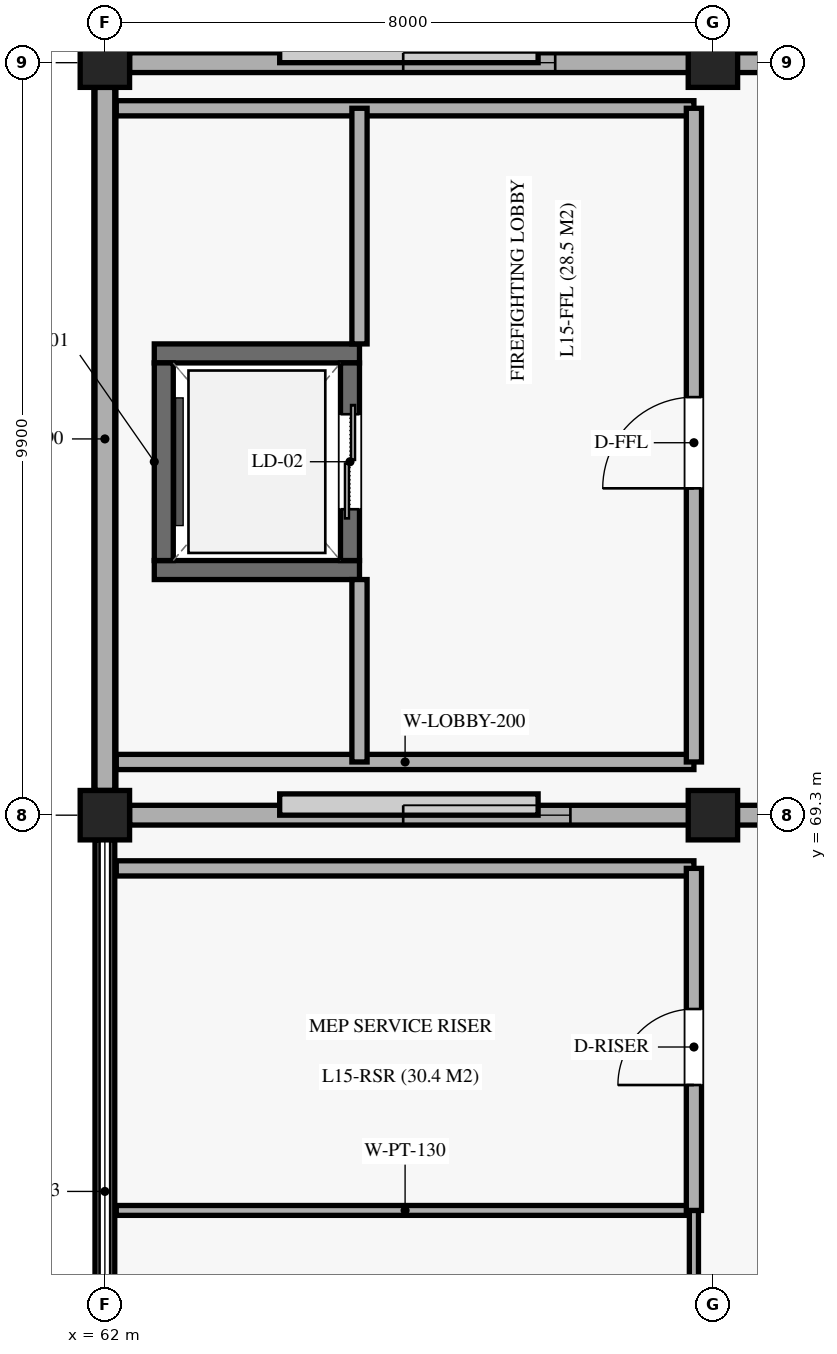
"""IFC4 building model, lengths in metres.
Left out: names, types, materials, properties, quantities, classifications, styles, units other than length and angle.
Written with IfcOpenShell. Run it as: python <this file> out.ifc"""

import sys

from ifc_helpers import new_model, si_unit, direction, frame, frame_2d, origin, origin_2d, place, context, subcontext, project, spatial, polyline, rectangle, outline, extrude, element, fill, save


model = new_model("IFC4")
c1 = context("Model", 3, precision=1e-05, world=origin(), true_north=direction((0.0, 1.0)))
c2 = subcontext(c1, "Body", "Model", "MODEL_VIEW")
j1 = project(units=[si_unit("LENGTHUNIT", "METRE"), si_unit("PLANEANGLEUNIT", "RADIAN")], contexts=[c1])
p1 = place(None, origin())
s1 = spatial("IfcSite", under=j1, at=p1, CompositionType="ELEMENT")
p2 = place(p1, origin())
s2 = spatial("IfcBuilding", under=s1, at=p2, CompositionType="ELEMENT")
p3 = place(p2, frame((0.0, 0.0, 74.46)))
s3 = spatial("IfcBuildingStorey", under=s2, at=p3, CompositionType="ELEMENT", Elevation=74.46)
for number, where, z_axis, x_axis in (
    (1, (62.0, 69.3, 0.0), (0.0, 0.0, 1.0), (1.0, 0.0, 0.0)),
    (2, (62.0, 79.2, 0.0), (0.0, 0.0, 1.0), (1.0, 0.0, 0.0)),
    (3, (70.0, 69.3, 0.0), (0.0, 0.0, 1.0), (1.0, 0.0, 0.0)),
    (4, (70.0, 79.2, 0.0), (0.0, 0.0, 1.0), (1.0, 0.0, 0.0)),
):
    element("IfcColumn", number, at=place(p3, frame(where, z_axis=z_axis, x_axis=x_axis)), inside=s3, PredefinedType="COLUMN", context=c2, shape_type="SweptSolid", body=[
        extrude(rectangle(XDim=0.65, YDim=0.65, at=origin_2d()), origin(), (0.0, 0.0, 1.0), 7.49),
    ])
p4 = place(p3, frame((62.0, 69.625, 0.0), z_axis=(0.0, 0.0, 1.0), x_axis=(0.0, 1.0, 0.0)))
e5 = element("IfcWall", 5, at=p4, inside=s3, PredefinedType="SOLIDWALL", context=c2, shape_type="SweptSolid", body=[
    extrude(rectangle(XDim=9.25, YDim=0.29, at=frame_2d((4.625, 0.0))), origin(), (0.0, 0.0, 1.0), 3.29),
])
p5 = place(p3, frame((62.325, 69.3, 4.04), z_axis=(0.0, 0.0, 1.0), x_axis=(1.0, 0.0, 0.0)))
e6 = element("IfcWall", 6, at=p5, inside=s3, PredefinedType="SOLIDWALL", context=c2, shape_type="SweptSolid", body=[
    extrude(rectangle(XDim=29.35, YDim=0.26, at=frame_2d((14.675, 0.0))), origin(), (0.0, 0.0, 1.0), 2.956),
])
p6 = place(p5, frame((3.6, 0.0, 1.15)))
e7 = element("IfcOpeningElement", 7, at=p6, cuts=e6, PredefinedType="OPENING", context=c2, shape_type="SweptSolid", body=[
    extrude(rectangle(XDim=2.2, YDim=1.45, at=frame_2d((1.1, 0.725))), frame((0.0, 0.14, 0.0), z_axis=(0.0, -1.0, 0.0), x_axis=(1.0, 0.0, 0.0)), (0.0, 0.0, 1.0), 0.28),
])
p7 = place(p5, frame((10.6, 0.0, 1.15)))
e8 = element("IfcOpeningElement", 8, at=p7, cuts=e6, PredefinedType="OPENING", context=c2, shape_type="SweptSolid", body=[
    extrude(rectangle(XDim=2.0, YDim=1.45, at=frame_2d((1.0, 0.725))), frame((0.0, 0.14, 0.0), z_axis=(0.0, -1.0, 0.0), x_axis=(1.0, 0.0, 0.0)), (0.0, 0.0, 1.0), 0.28),
])
p8 = place(p5, frame((16.6, 0.0, 1.15)))
e9 = element("IfcOpeningElement", 9, at=p8, cuts=e6, PredefinedType="OPENING", context=c2, shape_type="SweptSolid", body=[
    extrude(rectangle(XDim=2.6, YDim=1.45, at=frame_2d((1.3, 0.725))), frame((0.0, 0.14, 0.0), z_axis=(0.0, -1.0, 0.0), x_axis=(1.0, 0.0, 0.0)), (0.0, 0.0, 1.0), 0.28),
])
p9 = place(p5, frame((22.6, 0.0, 1.15)))
e10 = element("IfcOpeningElement", 10, at=p9, cuts=e6, PredefinedType="OPENING", context=c2, shape_type="SweptSolid", body=[
    extrude(rectangle(XDim=2.4, YDim=1.45, at=frame_2d((1.2, 0.725))), frame((0.0, 0.14, 0.0), z_axis=(0.0, -1.0, 0.0), x_axis=(1.0, 0.0, 0.0)), (0.0, 0.0, 1.0), 0.28),
])
p10 = place(p3, frame((62.0, 59.725, 4.04), z_axis=(0.0, 0.0, 1.0), x_axis=(0.0, 1.0, 0.0)))
e11 = element("IfcWall", 11, at=p10, inside=s3, PredefinedType="SOLIDWALL", context=c2, shape_type="SweptSolid", body=[
    extrude(outline(polyline([(0.0, 0.0), (9.25, 0.0), (9.25, 3.62), (0.0, 0.1), (0.0, 0.0)])), frame((0.0, 0.13, 0.0), z_axis=(0.0, -1.0, 0.0), x_axis=(1.0, 0.0, 0.0)), (0.0, 0.0, 1.0), 0.26),
])
p11 = place(p3, frame((62.325, 79.2, 4.04), z_axis=(0.0, 0.0, 1.0), x_axis=(1.0, 0.0, 0.0)))
e12 = element("IfcWall", 12, at=p11, inside=s3, PredefinedType="SOLIDWALL", context=c2, shape_type="SweptSolid", body=[
    extrude(rectangle(XDim=29.35, YDim=0.26, at=frame_2d((14.675, 0.0))), origin(), (0.0, 0.0, 1.0), 2.956),
])
p12 = place(p11, frame((3.6, 0.0, 1.15)))
e13 = element("IfcOpeningElement", 13, at=p12, cuts=e12, PredefinedType="OPENING", context=c2, shape_type="SweptSolid", body=[
    extrude(rectangle(XDim=2.0, YDim=1.45, at=frame_2d((1.0, 0.725))), frame((0.0, 0.14, 0.0), z_axis=(0.0, -1.0, 0.0), x_axis=(1.0, 0.0, 0.0)), (0.0, 0.0, 1.0), 0.28),
])
p13 = place(p11, frame((10.6, 0.0, 1.15)))
e14 = element("IfcOpeningElement", 14, at=p13, cuts=e12, PredefinedType="OPENING", context=c2, shape_type="SweptSolid", body=[
    extrude(rectangle(XDim=2.6, YDim=1.45, at=frame_2d((1.3, 0.725))), frame((0.0, 0.14, 0.0), z_axis=(0.0, -1.0, 0.0), x_axis=(1.0, 0.0, 0.0)), (0.0, 0.0, 1.0), 0.28),
])
p14 = place(p11, frame((16.6, 0.0, 1.15)))
e15 = element("IfcOpeningElement", 15, at=p14, cuts=e12, PredefinedType="OPENING", context=c2, shape_type="SweptSolid", body=[
    extrude(rectangle(XDim=2.4, YDim=1.45, at=frame_2d((1.2, 0.725))), frame((0.0, 0.14, 0.0), z_axis=(0.0, -1.0, 0.0), x_axis=(1.0, 0.0, 0.0)), (0.0, 0.0, 1.0), 0.28),
])
p15 = place(p11, frame((22.6, 0.0, 1.15)))
e16 = element("IfcOpeningElement", 16, at=p15, cuts=e12, PredefinedType="OPENING", context=c2, shape_type="SweptSolid", body=[
    extrude(rectangle(XDim=2.2, YDim=1.45, at=frame_2d((1.1, 0.725))), frame((0.0, 0.14, 0.0), z_axis=(0.0, -1.0, 0.0), x_axis=(1.0, 0.0, 0.0)), (0.0, 0.0, 1.0), 0.28),
])
p16 = place(p3, frame((62.0, 69.625, 4.04), z_axis=(0.0, 0.0, 1.0), x_axis=(0.0, 1.0, 0.0)))
e17 = element("IfcWall", 17, at=p16, inside=s3, PredefinedType="SOLIDWALL", context=c2, shape_type="SweptSolid", body=[
    extrude(outline(polyline([(0.0, 0.0), (9.25, 0.0), (9.25, 3.62), (0.0, 0.1), (0.0, 0.0)])), frame((0.0, 0.13, 0.0), z_axis=(0.0, -1.0, 0.0), x_axis=(1.0, 0.0, 0.0)), (0.0, 0.0, 1.0), 0.26),
])
for number, where, z_axis, x_axis in (
    (18, (62.65, 72.525, 0.0), (0.0, 0.0, 1.0), (1.0, 0.0, 0.0)),
    (19, (62.65, 75.375, 0.0), (0.0, 0.0, 1.0), (1.0, 0.0, 0.0)),
):
    element("IfcWall", number, at=place(p3, frame(where, z_axis=z_axis, x_axis=x_axis)), inside=s3, PredefinedType="SOLIDWALL", context=c2, shape_type="SweptSolid", body=[
        extrude(rectangle(XDim=2.7, YDim=0.25, at=frame_2d((1.35, 0.0))), origin(), (0.0, 0.0, 1.0), 4.02),
    ])
p17 = place(p3, frame((62.775, 72.65, 0.0), z_axis=(0.0, 0.0, 1.0), x_axis=(0.0, 1.0, 0.0)))
e20 = element("IfcWall", 20, at=p17, inside=s3, PredefinedType="SOLIDWALL", context=c2, shape_type="SweptSolid", body=[
    extrude(rectangle(XDim=2.6, YDim=0.25, at=frame_2d((1.3, 0.0))), origin(), (0.0, 0.0, 1.0), 4.02),
])
p18 = place(p3, frame((65.225, 72.65, 0.0), z_axis=(0.0, 0.0, 1.0), x_axis=(0.0, 1.0, 0.0)))
e21 = element("IfcWall", 21, at=p18, inside=s3, PredefinedType="SOLIDWALL", context=c2, shape_type="SweptSolid", body=[
    extrude(rectangle(XDim=2.6, YDim=0.25, at=frame_2d((1.3, 0.0))), origin(), (0.0, 0.0, 1.0), 4.02),
])
p19 = place(p18, frame((0.675, 0.0, 0.0)))
e22 = element("IfcOpeningElement", 22, at=p19, cuts=e21, PredefinedType="OPENING", context=c2, shape_type="SweptSolid", body=[
    extrude(rectangle(XDim=1.25, YDim=2.2, at=frame_2d((0.625, 1.1))), frame((0.0, 0.135, 0.0), z_axis=(0.0, -1.0, 0.0), x_axis=(1.0, 0.0, 0.0)), (0.0, 0.0, 1.0), 0.27),
])
for number, where, z_axis, x_axis in (
    (23, (62.15, 70.0, 0.0), (0.0, 0.0, 1.0), (1.0, 0.0, 0.0)),
    (24, (62.15, 78.6, 0.0), (0.0, 0.0, 1.0), (1.0, 0.0, 0.0)),
):
    element("IfcWall", number, at=place(p3, frame(where, z_axis=z_axis, x_axis=x_axis)), inside=s3, PredefinedType="SOLIDWALL", context=c2, shape_type="SweptSolid", body=[
        extrude(rectangle(XDim=7.6, YDim=0.2, at=frame_2d((3.8, 0.0))), origin(), (0.0, 0.0, 1.0), 3.16),
    ])
p20 = place(p3, frame((65.35, 70.0, 0.0), z_axis=(0.0, 0.0, 1.0), x_axis=(0.0, 1.0, 0.0)))
e25 = element("IfcWall", 25, at=p20, inside=s3, PredefinedType="SOLIDWALL", context=c2, shape_type="SweptSolid", body=[
    extrude(rectangle(XDim=2.4, YDim=0.2, at=frame_2d((1.2, 0.0))), origin(), (0.0, 0.0, 1.0), 3.16),
])
p21 = place(p3, frame((65.35, 75.5, 0.0), z_axis=(0.0, 0.0, 1.0), x_axis=(0.0, 1.0, 0.0)))
e26 = element("IfcWall", 26, at=p21, inside=s3, PredefinedType="SOLIDWALL", context=c2, shape_type="SweptSolid", body=[
    extrude(rectangle(XDim=3.1, YDim=0.2, at=frame_2d((1.55, 0.0))), origin(), (0.0, 0.0, 1.0), 3.16),
])
p22 = place(p3, frame((69.75, 70.0, 0.0), z_axis=(0.0, 0.0, 1.0), x_axis=(0.0, 1.0, 0.0)))
e27 = element("IfcWall", 27, at=p22, inside=s3, PredefinedType="SOLIDWALL", context=c2, shape_type="SweptSolid", body=[
    extrude(rectangle(XDim=8.6, YDim=0.2, at=frame_2d((4.3, 0.0))), origin(), (0.0, 0.0, 1.0), 3.16),
])
p23 = place(p22, frame((3.6, 0.0, 0.0)))
e28 = element("IfcOpeningElement", 28, at=p23, cuts=e27, PredefinedType="OPENING", context=c2, shape_type="SweptSolid", body=[
    extrude(rectangle(XDim=1.2, YDim=2.25, at=frame_2d((0.6, 1.125))), frame((0.0, 0.11, 0.0), z_axis=(0.0, -1.0, 0.0), x_axis=(1.0, 0.0, 0.0)), (0.0, 0.0, 1.0), 0.22),
])
p24 = place(p3, frame((62.15, 64.1, 0.0), z_axis=(0.0, 0.0, 1.0), x_axis=(1.0, 0.0, 0.0)))
e29 = element("IfcWall", 29, at=p24, inside=s3, PredefinedType="PARTITIONING", context=c2, shape_type="SweptSolid", body=[
    extrude(rectangle(XDim=7.6, YDim=0.13, at=frame_2d((3.8, 0.0))), origin(), (0.0, 0.0, 1.0), 3.16),
])
p25 = place(p3, frame((69.75, 59.9, 0.0), z_axis=(0.0, 0.0, 1.0), x_axis=(0.0, 1.0, 0.0)))
e30 = element("IfcWall", 30, at=p25, inside=s3, PredefinedType="PARTITIONING", context=c2, shape_type="SweptSolid", body=[
    extrude(rectangle(XDim=4.2, YDim=0.12, at=frame_2d((2.1, 0.0))), origin(), (0.0, 0.0, 1.0), 3.16),
])
p26 = place(p25, frame((1.5, 0.0, 0.0)))
e31 = element("IfcOpeningElement", 31, at=p26, cuts=e30, PredefinedType="OPENING", context=c2, shape_type="SweptSolid", body=[
    extrude(rectangle(XDim=0.95, YDim=2.1, at=frame_2d((0.475, 1.05))), frame((0.0, 0.07, 0.0), z_axis=(0.0, -1.0, 0.0), x_axis=(1.0, 0.0, 0.0)), (0.0, 0.0, 1.0), 0.14),
])
p27 = place(p3, frame((62.15, 68.6, 0.0), z_axis=(0.0, 0.0, 1.0), x_axis=(1.0, 0.0, 0.0)))
e32 = element("IfcWall", 32, at=p27, inside=s3, PredefinedType="SOLIDWALL", context=c2, shape_type="SweptSolid", body=[
    extrude(rectangle(XDim=7.6, YDim=0.2, at=frame_2d((3.8, 0.0))), origin(), (0.0, 0.0, 1.0), 3.16),
])
p28 = place(p3, frame((69.75, 64.1, 0.0), z_axis=(0.0, 0.0, 1.0), x_axis=(0.0, 1.0, 0.0)))
e33 = element("IfcWall", 33, at=p28, inside=s3, PredefinedType="SOLIDWALL", context=c2, shape_type="SweptSolid", body=[
    extrude(rectangle(XDim=4.5, YDim=0.2, at=frame_2d((2.25, 0.0))), origin(), (0.0, 0.0, 1.0), 3.16),
])
p29 = place(p28, frame((1.65, 0.0, 0.0)))
e34 = element("IfcOpeningElement", 34, at=p29, cuts=e33, PredefinedType="OPENING", context=c2, shape_type="SweptSolid", body=[
    extrude(rectangle(XDim=1.0, YDim=2.15, at=frame_2d((0.5, 1.075))), frame((0.0, 0.11, 0.0), z_axis=(0.0, -1.0, 0.0), x_axis=(1.0, 0.0, 0.0)), (0.0, 0.0, 1.0), 0.22),
])
p30 = place(p6, origin())
e35 = element("IfcWindow", 35, at=p30, inside=s3, PartitioningType="SINGLE_PANEL", PredefinedType="SKYLIGHT", context=c2, shape_type="SweptSolid", body=[
    extrude(rectangle(XDim=2.2, YDim=1.45, at=frame_2d((1.1, 0.725))), frame((0.0, 0.03, 0.0), z_axis=(0.0, -1.0, 0.0), x_axis=(1.0, 0.0, 0.0)), (0.0, 0.0, 1.0), 0.06),
])
fill(e7, e35)
p31 = place(p12, origin())
e36 = element("IfcWindow", 36, at=p31, inside=s3, PartitioningType="SINGLE_PANEL", PredefinedType="SKYLIGHT", context=c2, shape_type="SweptSolid", body=[
    extrude(rectangle(XDim=2.0, YDim=1.45, at=frame_2d((1.0, 0.725))), frame((0.0, 0.03, 0.0), z_axis=(0.0, -1.0, 0.0), x_axis=(1.0, 0.0, 0.0)), (0.0, 0.0, 1.0), 0.06),
])
fill(e13, e36)
p32 = place(p19, origin())
e37 = element("IfcDoor", 37, at=p32, inside=s3, OperationType="DOUBLE_DOOR_SLIDING", PredefinedType="DOOR", context=c2, shape_type="SweptSolid", body=[
    extrude(rectangle(XDim=1.25, YDim=2.2, at=frame_2d((0.625, 1.1))), frame((0.0, 0.025, 0.0), z_axis=(0.0, -1.0, 0.0), x_axis=(1.0, 0.0, 0.0)), (0.0, 0.0, 1.0), 0.05),
])
fill(e22, e37)
p33 = place(p23, origin())
e38 = element("IfcDoor", 38, at=p33, inside=s3, OperationType="SINGLE_SWING_LEFT", PredefinedType="DOOR", context=c2, shape_type="SweptSolid", body=[
    extrude(rectangle(XDim=1.2, YDim=2.25, at=frame_2d((0.6, 1.125))), frame((0.0, 0.025, 0.0), z_axis=(0.0, -1.0, 0.0), x_axis=(1.0, 0.0, 0.0)), (0.0, 0.0, 1.0), 0.05),
])
fill(e28, e38)
p34 = place(p29, origin())
e39 = element("IfcDoor", 39, at=p34, inside=s3, OperationType="SINGLE_SWING_LEFT", PredefinedType="DOOR", context=c2, shape_type="SweptSolid", body=[
    extrude(rectangle(XDim=1.0, YDim=2.15, at=frame_2d((0.5, 1.075))), frame((0.0, 0.025, 0.0), z_axis=(0.0, -1.0, 0.0), x_axis=(1.0, 0.0, 0.0)), (0.0, 0.0, 1.0), 0.05),
])
fill(e34, e39)
save(model, sys.argv[1])
